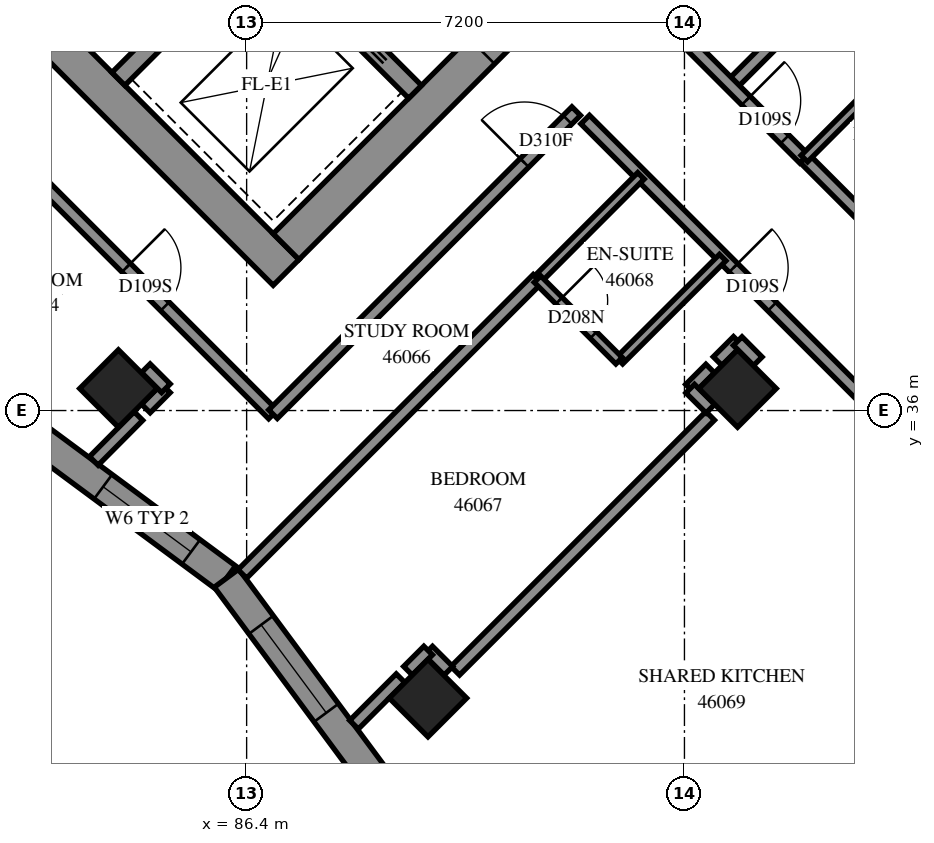
"""IFC4 building model, lengths in metres.
Left out: names, types, materials, properties, quantities, classifications, styles, units other than length and angle.
Written with IfcOpenShell. Run it as: python <this file> out.ifc"""

import sys

from ifc_helpers import new_model, si_unit, direction, frame, frame_2d, origin, origin_2d, place, context, subcontext, project, spatial, polyline, rectangle, outline, extrude, element, fill, save


model = new_model("IFC4")
c1 = context("Model", 3, precision=1e-05, world=origin(), true_north=direction((0.0, 1.0)))
c2 = subcontext(c1, "Body", "Model", "MODEL_VIEW")
j1 = project(units=[si_unit("LENGTHUNIT", "METRE"), si_unit("PLANEANGLEUNIT", "RADIAN")], contexts=[c1])
p1 = place(None, origin())
s1 = spatial("IfcSite", under=j1, at=p1, CompositionType="ELEMENT")
p2 = place(p1, origin())
s2 = spatial("IfcBuilding", under=s1, at=p2, CompositionType="ELEMENT")
p3 = place(p2, frame((0.0, 0.0, 169.4)))
s3 = spatial("IfcBuildingStorey", under=s2, at=p3, CompositionType="ELEMENT", Elevation=169.4)
for number, where, z_axis, x_axis in (
    (1, (84.291, 36.362, 0.0), (0.0, 0.0, 1.0), (0.707, -0.707, 0.0)),
    (2, (94.474, 36.362, 0.0), (0.0, 0.0, 1.0), (0.707, -0.707, 0.0)),
    (3, (89.382, 31.271, 0.0), (0.0, 0.0, 1.0), (0.707, -0.707, 0.0)),
):
    element("IfcColumn", number, at=place(p3, frame(where, z_axis=z_axis, x_axis=x_axis)), inside=s3, PredefinedType="COLUMN", context=c2, shape_type="SweptSolid", body=[
        extrude(rectangle(XDim=0.9, YDim=0.9, at=origin_2d()), origin(), (0.0, 0.0, 1.0), 3.1),
    ])
p4 = place(p3, frame((76.018, 49.302, -0.3), z_axis=(0.0, 0.0, 1.0), x_axis=(0.7071067812, -0.7071067812, 0.0)))
e4 = element("IfcWall", 4, at=p4, inside=s3, PredefinedType="SHEAR", context=c2, shape_type="SweptSolid", body=[
    extrude(rectangle(XDim=15.6, YDim=0.6, at=frame_2d((7.8, 0.0))), origin(), (0.0, 0.0, 1.0), 2.7),
])
p5 = place(p3, frame((87.049, 38.695, -0.3), z_axis=(0.0, 0.0, 1.0), x_axis=(0.7071067812, 0.7071067812, 0.0)))
e5 = element("IfcWall", 5, at=p5, inside=s3, PredefinedType="SHEAR", context=c2, shape_type="SweptSolid", body=[
    extrude(rectangle(XDim=14.4, YDim=0.6, at=frame_2d((7.2, 0.0))), origin(), (0.0, 0.0, 1.0), 2.7),
])
p6 = place(p5, frame((4.55, 0.0, 0.3)))
e6 = element("IfcOpeningElement", 6, at=p6, cuts=e5, PredefinedType="OPENING", context=c2, shape_type="SweptSolid", body=[
    extrude(rectangle(XDim=1.1, YDim=2.1, at=frame_2d((0.55, 1.05))), frame((0.0, 0.31, 0.0), z_axis=(0.0, -1.0, 0.0), x_axis=(1.0, 0.0, 0.0)), (0.0, 0.0, 1.0), 0.62),
])
p7 = place(p5, frame((11.35, 0.0, 0.3)))
e7 = element("IfcOpeningElement", 7, at=p7, cuts=e5, PredefinedType="OPENING", context=c2, shape_type="SweptSolid", body=[
    extrude(rectangle(XDim=1.1, YDim=2.1, at=frame_2d((0.55, 1.05))), frame((0.0, 0.31, 0.0), z_axis=(0.0, -1.0, 0.0), x_axis=(1.0, 0.0, 0.0)), (0.0, 0.0, 1.0), 0.62),
])
p8 = place(p3, frame((84.291, 41.453, 0.0), z_axis=(0.0, 0.0, 1.0), x_axis=(0.7071067812, 0.7071067812, 0.0)))
e8 = element("IfcWall", 8, at=p8, inside=s3, PredefinedType="SOLIDWALL", context=c2, shape_type="SweptSolid", body=[
    extrude(rectangle(XDim=3.3, YDim=0.3, at=frame_2d((1.65, 0.0))), origin(), (0.0, 0.0, 1.0), 3.1),
])
p9 = place(p3, frame((78.988, 51.423, 0.0), z_axis=(0.0, 0.0, 1.0), x_axis=(0.7071067812, -0.7071067812, 0.0)))
e9 = element("IfcWall", 9, at=p9, inside=s3, PredefinedType="SOLIDWALL", context=c2, shape_type="SweptSolid", body=[
    extrude(rectangle(XDim=14.4, YDim=0.3, at=frame_2d((7.2, 0.0))), origin(), (0.0, 0.0, 1.0), 3.1),
])
p10 = place(p9, frame((1.35, 0.0, 0.0)))
e10 = element("IfcOpeningElement", 10, at=p10, cuts=e9, PredefinedType="OPENING", context=c2, shape_type="SweptSolid", body=[
    extrude(rectangle(XDim=0.9, YDim=2.1, at=frame_2d((0.45, 1.05))), frame((0.0, 0.16, 0.0), z_axis=(0.0, -1.0, 0.0), x_axis=(1.0, 0.0, 0.0)), (0.0, 0.0, 1.0), 0.32),
])
p11 = place(p9, frame((4.95, 0.0, 0.0)))
e11 = element("IfcOpeningElement", 11, at=p11, cuts=e9, PredefinedType="OPENING", context=c2, shape_type="SweptSolid", body=[
    extrude(rectangle(XDim=0.9, YDim=2.1, at=frame_2d((0.45, 1.05))), frame((0.0, 0.16, 0.0), z_axis=(0.0, -1.0, 0.0), x_axis=(1.0, 0.0, 0.0)), (0.0, 0.0, 1.0), 0.32),
])
p12 = place(p9, frame((8.55, 0.0, 0.0)))
e12 = element("IfcOpeningElement", 12, at=p12, cuts=e9, PredefinedType="OPENING", context=c2, shape_type="SweptSolid", body=[
    extrude(rectangle(XDim=0.9, YDim=2.1, at=frame_2d((0.45, 1.05))), frame((0.0, 0.16, 0.0), z_axis=(0.0, -1.0, 0.0), x_axis=(1.0, 0.0, 0.0)), (0.0, 0.0, 1.0), 0.32),
])
p13 = place(p9, frame((12.05, 0.0, 0.0)))
e13 = element("IfcOpeningElement", 13, at=p13, cuts=e9, PredefinedType="OPENING", context=c2, shape_type="SweptSolid", body=[
    extrude(rectangle(XDim=1.1, YDim=2.1, at=frame_2d((0.55, 1.05))), frame((0.0, 0.16, 0.0), z_axis=(0.0, -1.0, 0.0), x_axis=(1.0, 0.0, 0.0)), (0.0, 0.0, 1.0), 0.32),
])
p14 = place(p3, frame((82.782, 35.678, 0.0), z_axis=(0.0, 0.0, 1.0), x_axis=(0.8036316743, -0.5951269881, 0.0)))
e14 = element("IfcWall", 14, at=p14, inside=s3, PredefinedType="SOLIDWALL", context=c2, shape_type="SweptSolid", body=[
    extrude(outline(polyline([(-0.037, -0.25), (4.053, -0.25), (4.128, 0.25), (0.037, 0.25), (-0.037, -0.25)])), origin(), (0.0, 0.0, 1.0), 3.1),
])
p15 = place(p14, frame((1.565, 0.0, 0.7)))
e15 = element("IfcOpeningElement", 15, at=p15, cuts=e14, PredefinedType="OPENING", context=c2, shape_type="SweptSolid", body=[
    extrude(rectangle(XDim=1.8, YDim=2.2, at=frame_2d((0.9, 1.1))), frame((0.0, 0.26, 0.0), z_axis=(0.0, -1.0, 0.0), x_axis=(1.0, 0.0, 0.0)), (0.0, 0.0, 1.0), 0.52),
])
p16 = place(p3, frame((86.07, 33.244, 0.0), z_axis=(0.0, 0.0, 1.0), x_axis=(0.5951427759, -0.8036199825, 0.0)))
e16 = element("IfcWall", 16, at=p16, inside=s3, PredefinedType="SOLIDWALL", context=c2, shape_type="SweptSolid", body=[
    extrude(outline(polyline([(0.037, -0.25), (4.128, -0.25), (4.053, 0.25), (-0.037, 0.25), (0.037, -0.25)])), origin(), (0.0, 0.0, 1.0), 3.1),
])
p17 = place(p16, frame((0.956, 0.0, 0.7)))
e17 = element("IfcOpeningElement", 17, at=p17, cuts=e16, PredefinedType="OPENING", context=c2, shape_type="SweptSolid", body=[
    extrude(rectangle(XDim=1.8, YDim=2.2, at=frame_2d((0.9, 1.1))), frame((0.0, 0.26, 0.0), z_axis=(0.0, -1.0, 0.0), x_axis=(1.0, 0.0, 0.0)), (0.0, 0.0, 1.0), 0.52),
])
p18 = place(p3, frame((94.366, 41.348, 0.0), z_axis=(0.0, 0.0, 1.0), x_axis=(0.7071108904, 0.707102672, 0.0)))
e18 = element("IfcWall", 18, at=p18, inside=s3, PredefinedType="PARTITIONING", context=c2, shape_type="SweptSolid", body=[
    extrude(rectangle(XDim=12.168, YDim=0.2, at=frame_2d((6.084, 0.0))), origin(), (0.0, 0.0, 1.0), 3.1),
])
p19 = place(p3, frame((91.967, 40.785, 0.0), z_axis=(0.0, 0.0, 1.0), x_axis=(0.7071067812, -0.7071067812, 0.0)))
e19 = element("IfcWall", 19, at=p19, inside=s3, PredefinedType="PARTITIONING", context=c2, shape_type="SweptSolid", body=[
    extrude(rectangle(XDim=12.1, YDim=0.2, at=frame_2d((6.05, 0.0))), origin(), (0.0, 0.0, 1.0), 3.1),
])
p20 = place(p19, frame((3.448, 0.0, 0.0)))
e20 = element("IfcOpeningElement", 20, at=p20, cuts=e19, PredefinedType="OPENING", context=c2, shape_type="SweptSolid", body=[
    extrude(rectangle(XDim=0.9, YDim=2.1, at=frame_2d((0.45, 1.05))), frame((0.0, 0.11, 0.0), z_axis=(0.0, -1.0, 0.0), x_axis=(1.0, 0.0, 0.0)), (0.0, 0.0, 1.0), 0.22),
])
p21 = place(p19, frame((8.457, 0.0, 0.0)))
e21 = element("IfcOpeningElement", 21, at=p21, cuts=e19, PredefinedType="OPENING", context=c2, shape_type="SweptSolid", body=[
    extrude(rectangle(XDim=1.0, YDim=2.1, at=frame_2d((0.5, 1.05))), frame((0.0, 0.11, 0.0), z_axis=(0.0, -1.0, 0.0), x_axis=(1.0, 0.0, 0.0)), (0.0, 0.0, 1.0), 0.22),
])
p22 = place(p3, frame((80.899, 41.869, 0.0), z_axis=(0.0, 0.0, 1.0), x_axis=(0.7071067812, -0.7071067812, 0.0)))
e22 = element("IfcWall", 22, at=p22, inside=s3, PredefinedType="PARTITIONING", context=c2, shape_type="SweptSolid", body=[
    extrude(rectangle(XDim=8.392, YDim=0.2, at=frame_2d((4.196, 0.0))), origin(), (0.0, 0.0, 1.0), 3.1),
])
p23 = place(p22, frame((4.979, 0.0, 0.0)))
e23 = element("IfcOpeningElement", 23, at=p23, cuts=e22, PredefinedType="OPENING", context=c2, shape_type="SweptSolid", body=[
    extrude(rectangle(XDim=0.9, YDim=2.1, at=frame_2d((0.45, 1.05))), frame((0.0, 0.11, 0.0), z_axis=(0.0, -1.0, 0.0), x_axis=(1.0, 0.0, 0.0)), (0.0, 0.0, 1.0), 0.22),
])
p24 = place(p3, frame((86.834, 35.94, 0.0), z_axis=(0.0, 0.0, 1.0), x_axis=(0.7072486139, 0.7069649201, 0.0)))
e24 = element("IfcWall", 24, at=p24, inside=s3, PredefinedType="PARTITIONING", context=c2, shape_type="SweptSolid", body=[
    extrude(rectangle(XDim=7.05, YDim=0.2, at=frame_2d((3.525, 0.0))), origin(), (0.0, 0.0, 1.0), 3.1),
])
p25 = place(p24, frame((5.848, 0.0, 0.0)))
e25 = element("IfcOpeningElement", 25, at=p25, cuts=e24, PredefinedType="OPENING", context=c2, shape_type="SweptSolid", body=[
    extrude(rectangle(XDim=1.0, YDim=2.1, at=frame_2d((0.5, 1.05))), frame((0.0, 0.11, 0.0), z_axis=(0.0, -1.0, 0.0), x_axis=(1.0, 0.0, 0.0)), (0.0, 0.0, 1.0), 0.22),
])
p26 = place(p3, frame((86.329, 33.313, 0.0), z_axis=(0.0, 0.0, 1.0), x_axis=(0.7072524502, 0.7069610821, 0.0)))
e26 = element("IfcWall", 26, at=p26, inside=s3, PredefinedType="PARTITIONING", context=c2, shape_type="SweptSolid", body=[
    extrude(rectangle(XDim=6.864, YDim=0.2, at=frame_2d((3.432, 0.0))), origin(), (0.0, 0.0, 1.0), 3.1),
])
p27 = place(p3, frame((89.831, 31.721, 0.0), z_axis=(0.0, 0.0, 1.0), x_axis=(0.7071067812, 0.7071067812, 0.0)))
e27 = element("IfcWall", 27, at=p27, inside=s3, PredefinedType="PARTITIONING", context=c2, shape_type="SweptSolid", body=[
    extrude(rectangle(XDim=5.928, YDim=0.2, at=frame_2d((2.964, 0.0))), origin(), (0.0, 0.0, 1.0), 3.1),
])
p28 = place(p3, frame((94.923, 26.631, 0.0), z_axis=(0.0, 0.0, 1.0), x_axis=(0.7071067812, 0.7071067812, 0.0)))
e28 = element("IfcWall", 28, at=p28, inside=s3, PredefinedType="PARTITIONING", context=c2, shape_type="SweptSolid", body=[
    extrude(rectangle(XDim=5.926, YDim=0.2, at=frame_2d((2.963, 0.0))), origin(), (0.0, 0.0, 1.0), 2.6),
])
p29 = place(p3, frame((95.573, 40.148, 0.0), z_axis=(0.0, 0.0, 1.0), x_axis=(0.7068698107, -0.7073436723, 0.0)))
e29 = element("IfcWall", 29, at=p29, inside=s3, PredefinedType="PARTITIONING", context=c2, shape_type="SweptSolid", body=[
    extrude(rectangle(XDim=3.799, YDim=0.2, at=frame_2d((1.899, 0.0))), origin(), (0.0, 0.0, 1.0), 3.1),
])
p30 = place(p3, frame((93.305, 42.403, 0.0), z_axis=(0.0, 0.0, 1.0), x_axis=(0.7071067812, -0.7071067812, 0.0)))
e30 = element("IfcWall", 30, at=p30, inside=s3, PredefinedType="PARTITIONING", context=c2, shape_type="SweptSolid", body=[
    extrude(rectangle(XDim=3.199, YDim=0.2, at=frame_2d((1.599, 0.0))), origin(), (0.0, 0.0, 1.0), 3.1),
])
p31 = place(p30, frame((1.848, 0.0, 0.0)))
e31 = element("IfcOpeningElement", 31, at=p31, cuts=e30, PredefinedType="OPENING", context=c2, shape_type="SweptSolid", body=[
    extrude(rectangle(XDim=0.9, YDim=2.1, at=frame_2d((0.45, 1.05))), frame((0.0, 0.11, 0.0), z_axis=(0.0, -1.0, 0.0), x_axis=(1.0, 0.0, 0.0)), (0.0, 0.0, 1.0), 0.22),
])
for number, where, z_axis, x_axis in (
    (32, (95.571, 40.143, 0.0), (0.0, 0.0, 1.0), (0.707, 0.708, 0.0)),
    (33, (91.189, 38.161, 0.0), (0.0, 0.0, 1.0), (0.707, 0.708, 0.0)),
    (34, (92.531, 36.819, 0.0), (0.0, 0.0, 1.0), (0.708, 0.707, 0.0)),
):
    element("IfcWall", number, at=place(p3, frame(where, z_axis=z_axis, x_axis=x_axis)), inside=s3, PredefinedType="PARTITIONING", context=c2, shape_type="SweptSolid", body=[
        extrude(rectangle(XDim=2.4, YDim=0.15, at=frame_2d((1.2, 0.0))), origin(), (0.0, 0.0, 1.0), 3.1),
    ])
p32 = place(p3, frame((91.183, 38.161, 0.0), z_axis=(0.0, 0.0, 1.0), x_axis=(0.7071067812, -0.7071067812, 0.0)))
e35 = element("IfcWall", 35, at=p32, inside=s3, PredefinedType="PARTITIONING", context=c2, shape_type="SweptSolid", body=[
    extrude(rectangle(XDim=1.898, YDim=0.15, at=frame_2d((0.949, 0.0))), origin(), (0.0, 0.0, 1.0), 3.1),
])
p33 = place(p32, frame((0.501, 0.0, 0.0)))
e36 = element("IfcOpeningElement", 36, at=p33, cuts=e35, PredefinedType="OPENING", context=c2, shape_type="SweptSolid", body=[
    extrude(rectangle(XDim=0.8, YDim=2.1, at=frame_2d((0.4, 1.05))), frame((0.0, 0.085, 0.0), z_axis=(0.0, -1.0, 0.0), x_axis=(1.0, 0.0, 0.0)), (0.0, 0.0, 1.0), 0.17),
])
p34 = place(p3, frame((88.166, 30.834, 0.0), z_axis=(0.0, 0.0, 1.0), x_axis=(0.7071067812, 0.7071067812, 0.0)))
e37 = element("IfcWall", 37, at=p34, inside=s3, PredefinedType="PARTITIONING", context=c2, shape_type="SweptSolid", body=[
    extrude(rectangle(XDim=1.082, YDim=0.2, at=frame_2d((0.541, 0.0))), origin(), (0.0, 0.0, 1.0), 3.1),
])
p35 = place(p3, frame((83.887, 35.172, 0.0), z_axis=(0.0, 0.0, 1.0), x_axis=(0.7051824299, 0.7090259096, 0.0)))
e38 = element("IfcWall", 38, at=p35, inside=s3, PredefinedType="PARTITIONING", context=c2, shape_type="SweptSolid", body=[
    extrude(rectangle(XDim=1.041, YDim=0.2, at=frame_2d((0.52, 0.0))), origin(), (0.0, 0.0, 1.0), 3.1),
])
for number, where, z_axis, x_axis in (
    (39, (94.145, 36.813, 0.0), (0.0, 0.0, 1.0), (0.707, 0.707, 0.0)),
    (40, (89.386, 32.052, 0.0), (0.0, 0.0, 1.0), (0.707, -0.707, 0.0)),
    (41, (89.053, 31.721, 0.0), (0.0, 0.0, 1.0), (0.707, 0.707, 0.0)),
    (42, (93.691, 36.359, 0.0), (0.0, 0.0, 1.0), (0.707, 0.707, 0.0)),
):
    element("IfcWall", number, at=place(p3, frame(where, z_axis=z_axis, x_axis=x_axis)), inside=s3, PredefinedType="PARTITIONING", context=c2, shape_type="SweptSolid", body=[
        extrude(rectangle(XDim=0.469, YDim=0.2, at=frame_2d((0.235, 0.0))), origin(), (0.0, 0.0, 1.0), 3.1),
    ])
for number, where, z_axis, x_axis in (
    (43, (94.476, 37.142, 0.0), (0.0, 0.0, 1.0), (0.705, -0.709, 0.0)),
    (44, (84.742, 36.034, 0.0), (0.0, 0.0, 1.0), (0.705, 0.709, 0.0)),
    (45, (93.695, 36.361, 0.0), (0.0, 0.0, 1.0), (0.709, -0.705, 0.0)),
):
    element("IfcWall", number, at=place(p3, frame(where, z_axis=z_axis, x_axis=x_axis)), inside=s3, PredefinedType="PARTITIONING", context=c2, shape_type="SweptSolid", body=[
        extrude(rectangle(XDim=0.468, YDim=0.2, at=frame_2d((0.234, 0.0))), origin(), (0.0, 0.0, 1.0), 3.1),
    ])
p36 = place(p3, frame((84.742, 36.696, 0.0), z_axis=(0.0, 0.0, 1.0), x_axis=(0.7071067812, -0.7071067812, 0.0)))
e46 = element("IfcWall", 46, at=p36, inside=s3, PredefinedType="PARTITIONING", context=c2, shape_type="SweptSolid", body=[
    extrude(rectangle(XDim=0.467, YDim=0.2, at=frame_2d((0.233, 0.0))), origin(), (0.0, 0.0, 1.0), 3.1),
])
p37 = place(p31, origin())
e47 = element("IfcDoor", 47, at=p37, inside=s3, OperationType="SINGLE_SWING_RIGHT", PredefinedType="DOOR", context=c2, shape_type="SweptSolid", body=[
    extrude(rectangle(XDim=0.9, YDim=2.1, at=frame_2d((0.45, 1.05))), frame((0.0, 0.025, 0.0), z_axis=(0.0, -1.0, 0.0), x_axis=(1.0, 0.0, 0.0)), (0.0, 0.0, 1.0), 0.05),
])
fill(e31, e47)
p38 = place(p23, origin())
e48 = element("IfcDoor", 48, at=p38, inside=s3, OperationType="SINGLE_SWING_RIGHT", PredefinedType="DOOR", context=c2, shape_type="SweptSolid", body=[
    extrude(rectangle(XDim=0.9, YDim=2.1, at=frame_2d((0.45, 1.05))), frame((0.0, 0.025, 0.0), z_axis=(0.0, -1.0, 0.0), x_axis=(1.0, 0.0, 0.0)), (0.0, 0.0, 1.0), 0.05),
])
fill(e23, e48)
p39 = place(p25, origin())
e49 = element("IfcDoor", 49, at=p39, inside=s3, OperationType="SINGLE_SWING_RIGHT", PredefinedType="DOOR", context=c2, shape_type="SweptSolid", body=[
    extrude(rectangle(XDim=1.0, YDim=2.1, at=frame_2d((0.5, 1.05))), frame((0.0, 0.025, 0.0), z_axis=(0.0, -1.0, 0.0), x_axis=(1.0, 0.0, 0.0)), (0.0, 0.0, 1.0), 0.05),
])
fill(e25, e49)
p40 = place(p20, origin())
e50 = element("IfcDoor", 50, at=p40, inside=s3, OperationType="SINGLE_SWING_LEFT", PredefinedType="DOOR", context=c2, shape_type="SweptSolid", body=[
    extrude(rectangle(XDim=0.9, YDim=2.1, at=frame_2d((0.45, 1.05))), frame((0.0, 0.025, 0.0), z_axis=(0.0, -1.0, 0.0), x_axis=(1.0, 0.0, 0.0)), (0.0, 0.0, 1.0), 0.05),
])
fill(e20, e50)
p41 = place(p33, origin())
e51 = element("IfcDoor", 51, at=p41, inside=s3, OperationType="SINGLE_SWING_RIGHT", PredefinedType="DOOR", context=c2, shape_type="SweptSolid", body=[
    extrude(rectangle(XDim=0.8, YDim=2.1, at=frame_2d((0.4, 1.05))), frame((0.0, 0.025, 0.0), z_axis=(0.0, -1.0, 0.0), x_axis=(1.0, 0.0, 0.0)), (0.0, 0.0, 1.0), 0.05),
])
fill(e36, e51)
p42 = place(p15, origin())
e52 = element("IfcWindow", 52, at=p42, inside=s3, PartitioningType="SINGLE_PANEL", PredefinedType="WINDOW", context=c2, shape_type="SweptSolid", body=[
    extrude(rectangle(XDim=1.8, YDim=2.2, at=frame_2d((0.9, 1.1))), frame((0.0, 0.18, 0.0), z_axis=(0.0, -1.0, 0.0), x_axis=(1.0, 0.0, 0.0)), (0.0, 0.0, 1.0), 0.06),
])
fill(e15, e52)
p43 = place(p17, origin())
e53 = element("IfcWindow", 53, at=p43, inside=s3, PartitioningType="SINGLE_PANEL", PredefinedType="WINDOW", context=c2, shape_type="SweptSolid", body=[
    extrude(rectangle(XDim=1.8, YDim=2.2, at=frame_2d((0.9, 1.1))), frame((0.0, 0.18, 0.0), z_axis=(0.0, -1.0, 0.0), x_axis=(1.0, 0.0, 0.0)), (0.0, 0.0, 1.0), 0.06),
])
fill(e17, e53)
save(model, sys.argv[1])
